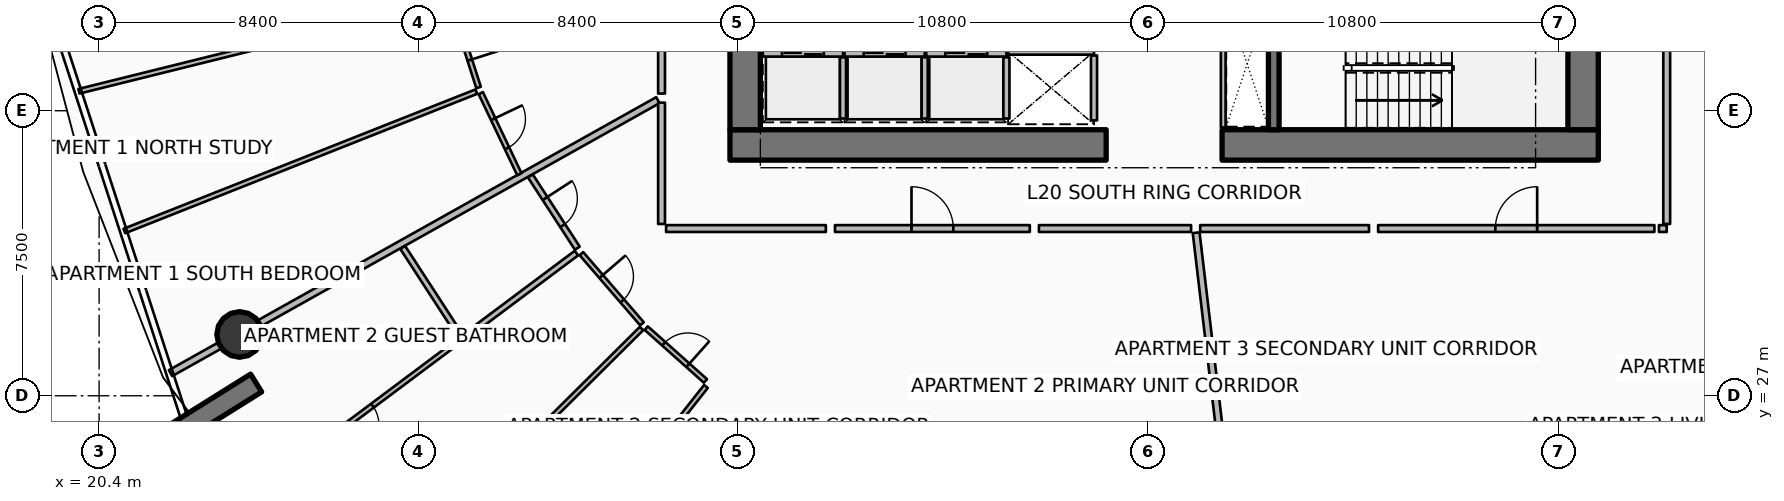
"""IFC4 building model, lengths in metres.
Left out: names, types, materials, properties, quantities, classifications, styles, units other than length and angle.
Written with IfcOpenShell. Run it as: python <this file> out.ifc"""

import sys

from ifc_helpers import new_model, si_unit, direction, frame, frame_2d, origin, origin_2d, place, context, subcontext, project, spatial, rectangle, circle, extrude, element, fill, save


model = new_model("IFC4")
c1 = context("Model", 3, precision=1e-05, world=origin(), true_north=direction((0.0, 1.0)))
c2 = subcontext(c1, "Body", "Model", "MODEL_VIEW")
j1 = project(units=[si_unit("LENGTHUNIT", "METRE"), si_unit("PLANEANGLEUNIT", "RADIAN")], contexts=[c1])
p1 = place(None, origin())
s1 = spatial("IfcSite", under=j1, at=p1, CompositionType="ELEMENT")
p2 = place(p1, origin())
s2 = spatial("IfcBuilding", under=s1, at=p2, CompositionType="ELEMENT")
p3 = place(p2, frame((0.0, 0.0, 82.65)))
s3 = spatial("IfcBuildingStorey", under=s2, at=p3, CompositionType="ELEMENT", Elevation=82.65)
p4 = place(p3, frame((37.0, 33.6, 0.0), z_axis=(0.0, 0.0, 1.0), x_axis=(1.0, 0.0, 0.0)))
e1 = element("IfcWall", 1, at=p4, inside=s3, PredefinedType="SHEAR", context=c2, shape_type="SweptSolid", body=[
    extrude(rectangle(XDim=9.9, YDim=0.8, at=frame_2d((4.95, 0.0))), origin(), (0.0, 0.0, 1.0), 3.75),
])
p5 = place(p3, frame((49.95, 33.6, 0.0), z_axis=(0.0, 0.0, 1.0), x_axis=(1.0, 0.0, 0.0)))
e2 = element("IfcWall", 2, at=p5, inside=s3, PredefinedType="SHEAR", context=c2, shape_type="SweptSolid", body=[
    extrude(rectangle(XDim=9.9, YDim=0.8, at=frame_2d((4.95, 0.0))), origin(), (0.0, 0.0, 1.0), 3.75),
])
for number, where, z_axis, x_axis in (
    (3, (37.4, 34.0, 0.0), (0.0, 0.0, 1.0), (0.0, 1.0, 0.0)),
    (4, (59.45, 34.0, 0.0), (0.0, 0.0, 1.0), (0.0, 1.0, 0.0)),
):
    element("IfcWall", number, at=place(p3, frame(where, z_axis=z_axis, x_axis=x_axis)), inside=s3, PredefinedType="SHEAR", context=c2, shape_type="SweptSolid", body=[
        extrude(rectangle(XDim=16.0, YDim=0.8, at=frame_2d((8.0, 0.0))), origin(), (0.0, 0.0, 1.0), 3.75),
    ])
p6 = place(p3, frame((51.31, 34.0, 0.0), z_axis=(0.0, 0.0, 1.0), x_axis=(0.0, 1.0, 0.0)))
e5 = element("IfcWall", 5, at=p6, inside=s3, PredefinedType="SHEAR", context=c2, shape_type="SweptSolid", body=[
    extrude(rectangle(XDim=3.5, YDim=0.28, at=frame_2d((1.75, 0.0))), origin(), (0.0, 0.0, 1.0), 3.75),
])
p7 = place(p3, frame((24.531, 27.335, 0.0), z_axis=(0.0, 0.0, 1.0), x_axis=(-0.848053161125, -0.529911158502, 0.0)))
e6 = element("IfcWall", 6, at=p7, inside=s3, PredefinedType="SOLIDWALL", context=c2, shape_type="SweptSolid", body=[
    extrude(rectangle(XDim=3.5, YDim=0.55, at=frame_2d((1.75, 0.0))), origin(), (0.0, 0.0, 1.0), 3.75),
])
p8 = place(p3, frame((24.097, 28.614, 0.0), z_axis=(0.0, 0.0, 1.0), x_axis=(1.0, 0.0, 0.0)))
e7 = element("IfcColumn", 7, at=p8, inside=s3, PredefinedType="COLUMN", context=c2, shape_type="SweptSolid", body=[
    extrude(circle(Radius=0.6, at=origin_2d()), origin(), (0.0, 0.0, 1.0), 3.5),
])
p9 = place(p3, frame((37.865, 36.005, 0.0), z_axis=(0.0, 0.0, 1.0), x_axis=(1.0, 0.0, 0.0)))
e8 = element("IfcWall", 8, at=p9, inside=s3, PredefinedType="PARTITIONING", context=c2, shape_type="SweptSolid", body=[
    extrude(rectangle(XDim=2.11, YDim=0.16, at=frame_2d((1.055, 0.0))), origin(), (0.0, 0.0, 1.0), 3.5),
])
p10 = place(p9, frame((0.505, 0.0, 0.0)))
e9 = element("IfcOpeningElement", 9, at=p10, cuts=e8, PredefinedType="OPENING", context=c2, shape_type="SweptSolid", body=[
    extrude(rectangle(XDim=1.1, YDim=2.1, at=frame_2d((0.55, 1.05))), frame((0.0, 0.09, 0.0), z_axis=(0.0, -1.0, 0.0), x_axis=(1.0, 0.0, 0.0)), (0.0, 0.0, 1.0), 0.18),
])
p11 = place(p3, frame((39.975, 34.295, 0.0), z_axis=(0.0, 0.0, 1.0), x_axis=(0.0, 1.0, 0.0)))
e10 = element("IfcWall", 10, at=p11, inside=s3, PredefinedType="PARTITIONING", context=c2, shape_type="SweptSolid", body=[
    extrude(rectangle(XDim=1.61, YDim=0.16, at=frame_2d((0.805, 0.0))), origin(), (0.0, 0.0, 1.0), 3.5),
])
p12 = place(p3, frame((40.015, 36.005, 0.0), z_axis=(0.0, 0.0, 1.0), x_axis=(1.0, 0.0, 0.0)))
e11 = element("IfcWall", 11, at=p12, inside=s3, PredefinedType="PARTITIONING", context=c2, shape_type="SweptSolid", body=[
    extrude(rectangle(XDim=2.11, YDim=0.16, at=frame_2d((1.055, 0.0))), origin(), (0.0, 0.0, 1.0), 3.5),
])
p13 = place(p12, frame((0.505, 0.0, 0.0)))
e12 = element("IfcOpeningElement", 12, at=p13, cuts=e11, PredefinedType="OPENING", context=c2, shape_type="SweptSolid", body=[
    extrude(rectangle(XDim=1.1, YDim=2.1, at=frame_2d((0.55, 1.05))), frame((0.0, 0.09, 0.0), z_axis=(0.0, -1.0, 0.0), x_axis=(1.0, 0.0, 0.0)), (0.0, 0.0, 1.0), 0.18),
])
p14 = place(p3, frame((42.125, 34.295, 0.0), z_axis=(0.0, 0.0, 1.0), x_axis=(0.0, 1.0, 0.0)))
e13 = element("IfcWall", 13, at=p14, inside=s3, PredefinedType="PARTITIONING", context=c2, shape_type="SweptSolid", body=[
    extrude(rectangle(XDim=1.61, YDim=0.16, at=frame_2d((0.805, 0.0))), origin(), (0.0, 0.0, 1.0), 3.5),
])
p15 = place(p3, frame((42.165, 36.005, 0.0), z_axis=(0.0, 0.0, 1.0), x_axis=(1.0, 0.0, 0.0)))
e14 = element("IfcWall", 14, at=p15, inside=s3, PredefinedType="PARTITIONING", context=c2, shape_type="SweptSolid", body=[
    extrude(rectangle(XDim=2.11, YDim=0.16, at=frame_2d((1.055, 0.0))), origin(), (0.0, 0.0, 1.0), 3.5),
])
p16 = place(p15, frame((0.505, 0.0, 0.0)))
e15 = element("IfcOpeningElement", 15, at=p16, cuts=e14, PredefinedType="OPENING", context=c2, shape_type="SweptSolid", body=[
    extrude(rectangle(XDim=1.1, YDim=2.1, at=frame_2d((0.55, 1.05))), frame((0.0, 0.09, 0.0), z_axis=(0.0, -1.0, 0.0), x_axis=(1.0, 0.0, 0.0)), (0.0, 0.0, 1.0), 0.18),
])
p17 = place(p3, frame((44.275, 34.295, 0.0), z_axis=(0.0, 0.0, 1.0), x_axis=(0.0, 1.0, 0.0)))
e16 = element("IfcWall", 16, at=p17, inside=s3, PredefinedType="PARTITIONING", context=c2, shape_type="SweptSolid", body=[
    extrude(rectangle(XDim=1.61, YDim=0.16, at=frame_2d((0.805, 0.0))), origin(), (0.0, 0.0, 1.0), 3.5),
])
p18 = place(p3, frame((44.32, 36.055, 0.0), z_axis=(0.0, 0.0, 1.0), x_axis=(1.0, 0.0, 0.0)))
e17 = element("IfcWall", 17, at=p18, inside=s3, PredefinedType="PARTITIONING", context=c2, shape_type="SweptSolid", body=[
    extrude(rectangle(XDim=2.26, YDim=0.16, at=frame_2d((1.13, 0.0))), origin(), (0.0, 0.0, 1.0), 3.5),
])
p19 = place(p3, frame((46.58, 34.245, 0.0), z_axis=(0.0, 0.0, 1.0), x_axis=(0.0, 1.0, 0.0)))
e18 = element("IfcWall", 18, at=p19, inside=s3, PredefinedType="PARTITIONING", context=c2, shape_type="SweptSolid", body=[
    extrude(rectangle(XDim=1.71, YDim=0.16, at=frame_2d((0.855, 0.0))), origin(), (0.0, 0.0, 1.0), 3.5),
])
p20 = place(p3, frame((49.98, 34.06, 0.0), z_axis=(0.0, 0.0, 1.0), x_axis=(0.0, 1.0, 0.0)))
e19 = element("IfcWall", 19, at=p20, inside=s3, PredefinedType="PARTITIONING", context=c2, shape_type="SweptSolid", body=[
    extrude(rectangle(XDim=3.4, YDim=0.125, at=frame_2d((1.7, 0.0))), origin(), (0.0, 0.0, 1.0), 2.94),
])
p21 = place(p3, frame((35.104, 34.778, 0.0), z_axis=(0.0, 0.0, 1.0), x_axis=(-0.872490437896, -0.488631185845, 0.0)))
e20 = element("IfcWall", 20, at=p21, inside=s3, PredefinedType="PARTITIONING", context=c2, shape_type="SweptSolid", body=[
    extrude(rectangle(XDim=14.699, YDim=0.18, at=frame_2d((7.35, 0.0))), origin(), (0.0, 0.0, 1.0), 2.94),
])
p22 = place(p3, frame((49.268, 31.291, 0.0), z_axis=(0.0, 0.0, 1.0), x_axis=(0.117532311618, -0.993069058891, 0.0)))
e21 = element("IfcWall", 21, at=p22, inside=s3, PredefinedType="PARTITIONING", context=c2, shape_type="SweptSolid", body=[
    extrude(rectangle(XDim=13.138, YDim=0.18, at=frame_2d((6.569, 0.0))), origin(), (0.0, 0.0, 1.0), 2.94),
])
p23 = place(p3, frame((61.756, 38.12, 0.0), z_axis=(0.0, 0.0, 1.0), x_axis=(0.962455861176, -0.271438234756, 0.0)))
e22 = element("IfcWall", 22, at=p23, inside=s3, PredefinedType="PARTITIONING", context=c2, shape_type="SweptSolid", body=[
    extrude(rectangle(XDim=14.279, YDim=0.18, at=frame_2d((7.139, 0.0))), origin(), (0.0, 0.0, 1.0), 2.94),
])
p24 = place(p3, frame((35.2, 40.365, 0.0), z_axis=(0.0, 0.0, 1.0), x_axis=(0.0, -1.0, 0.0)))
e23 = element("IfcWall", 23, at=p24, inside=s3, PredefinedType="PARTITIONING", context=c2, shape_type="SweptSolid", body=[
    extrude(rectangle(XDim=5.413, YDim=0.18, at=frame_2d((2.707, 0.0))), origin(), (0.0, 0.0, 1.0), 2.94),
])
p25 = place(p3, frame((29.552, 37.417, 0.0), z_axis=(0.0, 0.0, 1.0), x_axis=(-0.970504192203, -0.241084244437, 0.0)))
e24 = element("IfcWall", 24, at=p25, inside=s3, PredefinedType="PARTITIONING", context=c2, shape_type="SweptSolid", body=[
    extrude(rectangle(XDim=9.976, YDim=0.125, at=frame_2d((4.988, 0.0))), origin(), (0.0, 0.0, 1.0), 2.94),
])
p26 = place(p3, frame((30.326, 35.002, 0.0), z_axis=(0.0, 0.0, 1.0), x_axis=(-0.929777602375, -0.368121732748, 0.0)))
e25 = element("IfcWall", 25, at=p26, inside=s3, PredefinedType="PARTITIONING", context=c2, shape_type="SweptSolid", body=[
    extrude(rectangle(XDim=9.961, YDim=0.125, at=frame_2d((4.98, 0.0))), origin(), (0.0, 0.0, 1.0), 2.94),
])
p27 = place(p3, frame((29.663, 37.363, 0.0), z_axis=(0.0, 0.0, 1.0), x_axis=(0.305393983716, -0.952226083822, 0.0)))
e26 = element("IfcWall", 26, at=p27, inside=s3, PredefinedType="PARTITIONING", context=c2, shape_type="SweptSolid", body=[
    extrude(rectangle(XDim=2.364, YDim=0.125, at=frame_2d((1.182, 0.0))), origin(), (0.0, 0.0, 1.0), 2.94),
])
p28 = place(p27, frame((0.757, 0.0, 0.0)))
e27 = element("IfcOpeningElement", 27, at=p28, cuts=e26, PredefinedType="OPENING", context=c2, shape_type="SweptSolid", body=[
    extrude(rectangle(XDim=0.85, YDim=2.06, at=frame_2d((0.425, 1.03))), frame((0.0, 0.073, 0.0), z_axis=(0.0, -1.0, 0.0), x_axis=(1.0, 0.0, 0.0)), (0.0, 0.0, 1.0), 0.145),
])
p29 = place(p3, frame((30.444, 34.963, 0.0), z_axis=(0.0, 0.0, 1.0), x_axis=(0.429404357622, -0.903112339443, 0.0)))
e28 = element("IfcWall", 28, at=p29, inside=s3, PredefinedType="PARTITIONING", context=c2, shape_type="SweptSolid", body=[
    extrude(rectangle(XDim=2.364, YDim=0.125, at=frame_2d((1.182, 0.0))), origin(), (0.0, 0.0, 1.0), 2.94),
])
p30 = place(p29, frame((0.757, 0.0, 0.0)))
e29 = element("IfcOpeningElement", 29, at=p30, cuts=e28, PredefinedType="OPENING", context=c2, shape_type="SweptSolid", body=[
    extrude(rectangle(XDim=0.85, YDim=2.06, at=frame_2d((0.425, 1.03))), frame((0.0, 0.073, 0.0), z_axis=(0.0, -1.0, 0.0), x_axis=(1.0, 0.0, 0.0)), (0.0, 0.0, 1.0), 0.145),
])
p31 = place(p3, frame((39.764, 31.4, 0.0), z_axis=(0.0, 0.0, 1.0), x_axis=(1.0, 0.0, 0.0)))
e30 = element("IfcWall", 30, at=p31, inside=s3, PredefinedType="PARTITIONING", context=c2, shape_type="SweptSolid", body=[
    extrude(rectangle(XDim=5.127, YDim=0.18, at=frame_2d((2.563, 0.0))), origin(), (0.0, 0.0, 1.0), 2.94),
])
p32 = place(p31, frame((2.013, 0.0, 0.0)))
e31 = element("IfcOpeningElement", 31, at=p32, cuts=e30, PredefinedType="OPENING", context=c2, shape_type="SweptSolid", body=[
    extrude(rectangle(XDim=1.1, YDim=2.1, at=frame_2d((0.55, 1.05))), frame((0.0, 0.1, 0.0), z_axis=(0.0, -1.0, 0.0), x_axis=(1.0, 0.0, 0.0)), (0.0, 0.0, 1.0), 0.2),
])
p33 = place(p3, frame((35.2, 34.712, 0.0), z_axis=(0.0, 0.0, 1.0), x_axis=(0.0, -1.0, 0.0)))
e32 = element("IfcWall", 32, at=p33, inside=s3, PredefinedType="PARTITIONING", context=c2, shape_type="SweptSolid", body=[
    extrude(rectangle(XDim=3.192, YDim=0.18, at=frame_2d((1.596, 0.0))), origin(), (0.0, 0.0, 1.0), 2.94),
])
p34 = place(p3, frame((35.32, 31.4, 0.0), z_axis=(0.0, 0.0, 1.0), x_axis=(1.0, 0.0, 0.0)))
e33 = element("IfcWall", 33, at=p34, inside=s3, PredefinedType="PARTITIONING", context=c2, shape_type="SweptSolid", body=[
    extrude(rectangle(XDim=4.204, YDim=0.18, at=frame_2d((2.102, 0.0))), origin(), (0.0, 0.0, 1.0), 2.94),
])
p35 = place(p3, frame((36.368, 27.245, 0.0), z_axis=(0.0, 0.0, 1.0), x_axis=(-0.619096231027, -0.785315132115, 0.0)))
e34 = element("IfcWall", 34, at=p35, inside=s3, PredefinedType="PARTITIONING", context=c2, shape_type="SweptSolid", body=[
    extrude(rectangle(XDim=9.882, YDim=0.125, at=frame_2d((4.941, 0.0))), origin(), (0.0, 0.0, 1.0), 2.94),
])
p36 = place(p3, frame((31.748, 32.784, 0.0), z_axis=(0.0, 0.0, 1.0), x_axis=(0.544920213423, -0.838487901524, 0.0)))
e35 = element("IfcWall", 35, at=p36, inside=s3, PredefinedType="PARTITIONING", context=c2, shape_type="SweptSolid", body=[
    extrude(rectangle(XDim=2.267, YDim=0.15, at=frame_2d((1.134, 0.0))), origin(), (0.0, 0.0, 1.0), 2.94),
])
p37 = place(p36, frame((0.708, 0.0, 0.0)))
e36 = element("IfcOpeningElement", 36, at=p37, cuts=e35, PredefinedType="OPENING", context=c2, shape_type="SweptSolid", body=[
    extrude(rectangle(XDim=0.85, YDim=2.06, at=frame_2d((0.425, 1.03))), frame((0.0, 0.085, 0.0), z_axis=(0.0, -1.0, 0.0), x_axis=(1.0, 0.0, 0.0)), (0.0, 0.0, 1.0), 0.17),
])
p38 = place(p3, frame((28.389, 30.903, 0.0), z_axis=(0.0, 0.0, 1.0), x_axis=(0.544849096032, -0.838534115318, 0.0)))
e37 = element("IfcWall", 37, at=p38, inside=s3, PredefinedType="PARTITIONING", context=c2, shape_type="SweptSolid", body=[
    extrude(rectangle(XDim=2.773, YDim=0.15, at=frame_2d((1.387, 0.0))), origin(), (0.0, 0.0, 1.0), 2.94),
])
p39 = place(p3, frame((32.961, 30.754, 0.0), z_axis=(0.0, 0.0, 1.0), x_axis=(-0.800889069655, -0.598812740435, 0.0)))
e38 = element("IfcWall", 38, at=p39, inside=s3, PredefinedType="PARTITIONING", context=c2, shape_type="SweptSolid", body=[
    extrude(rectangle(XDim=3.72, YDim=0.15, at=frame_2d((1.86, 0.0))), origin(), (0.0, 0.0, 1.0), 2.94),
])
p40 = place(p3, frame((29.877, 28.448, 0.0), z_axis=(0.0, 0.0, 1.0), x_axis=(-0.800862229892, -0.598848635911, 0.0)))
e39 = element("IfcWall", 39, at=p40, inside=s3, PredefinedType="PARTITIONING", context=c2, shape_type="SweptSolid", body=[
    extrude(rectangle(XDim=6.552, YDim=0.125, at=frame_2d((3.276, 0.0))), origin(), (0.0, 0.0, 1.0), 2.94),
])
p41 = place(p40, frame((2.851, 0.0, 0.0)))
e40 = element("IfcOpeningElement", 40, at=p41, cuts=e39, PredefinedType="OPENING", context=c2, shape_type="SweptSolid", body=[
    extrude(rectangle(XDim=0.85, YDim=2.06, at=frame_2d((0.425, 1.03))), frame((0.0, 0.073, 0.0), z_axis=(0.0, -1.0, 0.0), x_axis=(1.0, 0.0, 0.0)), (0.0, 0.0, 1.0), 0.145),
])
p42 = place(p3, frame((34.673, 28.769, 0.0), z_axis=(0.0, 0.0, 1.0), x_axis=(-0.709671596246, -0.70453262911, 0.0)))
e41 = element("IfcWall", 41, at=p42, inside=s3, PredefinedType="PARTITIONING", context=c2, shape_type="SweptSolid", body=[
    extrude(rectangle(XDim=9.882, YDim=0.125, at=frame_2d((4.941, 0.0))), origin(), (0.0, 0.0, 1.0), 2.94),
])
p43 = place(p3, frame((33.092, 30.74, 0.0), z_axis=(0.0, 0.0, 1.0), x_axis=(0.653244508484, -0.757147021479, 0.0)))
e42 = element("IfcWall", 42, at=p43, inside=s3, PredefinedType="PARTITIONING", context=c2, shape_type="SweptSolid", body=[
    extrude(rectangle(XDim=2.439, YDim=0.125, at=frame_2d((1.219, 0.0))), origin(), (0.0, 0.0, 1.0), 2.94),
])
p44 = place(p43, frame((0.794, 0.0, 0.0)))
e43 = element("IfcOpeningElement", 43, at=p44, cuts=e42, PredefinedType="OPENING", context=c2, shape_type="SweptSolid", body=[
    extrude(rectangle(XDim=0.85, YDim=2.06, at=frame_2d((0.425, 1.03))), frame((0.0, 0.073, 0.0), z_axis=(0.0, -1.0, 0.0), x_axis=(1.0, 0.0, 0.0)), (0.0, 0.0, 1.0), 0.145),
])
p45 = place(p3, frame((34.797, 28.78, 0.0), z_axis=(0.0, 0.0, 1.0), x_axis=(0.74635037564, -0.665553241132, 0.0)))
e44 = element("IfcWall", 44, at=p45, inside=s3, PredefinedType="PARTITIONING", context=c2, shape_type="SweptSolid", body=[
    extrude(rectangle(XDim=2.088, YDim=0.125, at=frame_2d((1.044, 0.0))), origin(), (0.0, 0.0, 1.0), 2.94),
])
p46 = place(p45, frame((0.619, 0.0, 0.0)))
e45 = element("IfcOpeningElement", 45, at=p46, cuts=e44, PredefinedType="OPENING", context=c2, shape_type="SweptSolid", body=[
    extrude(rectangle(XDim=0.85, YDim=2.06, at=frame_2d((0.425, 1.03))), frame((0.0, 0.073, 0.0), z_axis=(0.0, -1.0, 0.0), x_axis=(1.0, 0.0, 0.0)), (0.0, 0.0, 1.0), 0.145),
])
p47 = place(p3, frame((45.131, 31.4, 0.0), z_axis=(0.0, 0.0, 1.0), x_axis=(1.0, 0.0, 0.0)))
e46 = element("IfcWall", 46, at=p47, inside=s3, PredefinedType="PARTITIONING", context=c2, shape_type="SweptSolid", body=[
    extrude(rectangle(XDim=4.004, YDim=0.18, at=frame_2d((2.002, 0.0))), origin(), (0.0, 0.0, 1.0), 2.94),
])
p48 = place(p3, frame((54.056, 31.4, 0.0), z_axis=(0.0, 0.0, 1.0), x_axis=(1.0, 0.0, 0.0)))
e47 = element("IfcWall", 47, at=p48, inside=s3, PredefinedType="PARTITIONING", context=c2, shape_type="SweptSolid", body=[
    extrude(rectangle(XDim=7.27, YDim=0.18, at=frame_2d((3.635, 0.0))), origin(), (0.0, 0.0, 1.0), 2.94),
])
p49 = place(p48, frame((3.085, 0.0, 0.0)))
e48 = element("IfcOpeningElement", 48, at=p49, cuts=e47, PredefinedType="OPENING", context=c2, shape_type="SweptSolid", body=[
    extrude(rectangle(XDim=1.1, YDim=2.1, at=frame_2d((0.55, 1.05))), frame((0.0, 0.1, 0.0), z_axis=(0.0, -1.0, 0.0), x_axis=(1.0, 0.0, 0.0)), (0.0, 0.0, 1.0), 0.2),
])
p50 = place(p3, frame((49.375, 31.4, 0.0), z_axis=(0.0, 0.0, 1.0), x_axis=(1.0, 0.0, 0.0)))
e49 = element("IfcWall", 49, at=p50, inside=s3, PredefinedType="PARTITIONING", context=c2, shape_type="SweptSolid", body=[
    extrude(rectangle(XDim=4.442, YDim=0.18, at=frame_2d((2.221, 0.0))), origin(), (0.0, 0.0, 1.0), 2.94),
])
p51 = place(p3, frame((61.446, 31.4, 0.0), z_axis=(0.0, 0.0, 1.0), x_axis=(1.0, 0.0, 0.0)))
e50 = element("IfcWall", 50, at=p51, inside=s3, PredefinedType="PARTITIONING", context=c2, shape_type="SweptSolid", body=[
    extrude(rectangle(XDim=0.204, YDim=0.18, at=frame_2d((0.102, 0.0))), origin(), (0.0, 0.0, 1.0), 2.94),
])
p52 = place(p3, frame((61.65, 31.52, 0.0), z_axis=(0.0, 0.0, 1.0), x_axis=(0.0, 1.0, 0.0)))
e51 = element("IfcWall", 51, at=p52, inside=s3, PredefinedType="PARTITIONING", context=c2, shape_type="SweptSolid", body=[
    extrude(rectangle(XDim=6.51, YDim=0.18, at=frame_2d((3.255, 0.0))), origin(), (0.0, 0.0, 1.0), 2.94),
])
p53 = place(p10, origin())
e52 = element("IfcDoor", 52, at=p53, inside=s3, OperationType="DOUBLE_DOOR_SLIDING", PredefinedType="DOOR", context=c2, shape_type="SweptSolid", body=[
    extrude(rectangle(XDim=1.1, YDim=2.1, at=frame_2d((0.55, 1.05))), frame((0.0, 0.025, 0.0), z_axis=(0.0, -1.0, 0.0), x_axis=(1.0, 0.0, 0.0)), (0.0, 0.0, 1.0), 0.05),
])
fill(e9, e52)
p54 = place(p13, origin())
e53 = element("IfcDoor", 53, at=p54, inside=s3, OperationType="DOUBLE_DOOR_SLIDING", PredefinedType="DOOR", context=c2, shape_type="SweptSolid", body=[
    extrude(rectangle(XDim=1.1, YDim=2.1, at=frame_2d((0.55, 1.05))), frame((0.0, 0.025, 0.0), z_axis=(0.0, -1.0, 0.0), x_axis=(1.0, 0.0, 0.0)), (0.0, 0.0, 1.0), 0.05),
])
fill(e12, e53)
p55 = place(p16, origin())
e54 = element("IfcDoor", 54, at=p55, inside=s3, OperationType="DOUBLE_DOOR_SLIDING", PredefinedType="DOOR", context=c2, shape_type="SweptSolid", body=[
    extrude(rectangle(XDim=1.1, YDim=2.1, at=frame_2d((0.55, 1.05))), frame((0.0, 0.025, 0.0), z_axis=(0.0, -1.0, 0.0), x_axis=(1.0, 0.0, 0.0)), (0.0, 0.0, 1.0), 0.05),
])
fill(e15, e54)
p56 = place(p28, origin())
e55 = element("IfcDoor", 55, at=p56, inside=s3, OperationType="SINGLE_SWING_RIGHT", PredefinedType="DOOR", context=c2, shape_type="SweptSolid", body=[
    extrude(rectangle(XDim=0.85, YDim=2.06, at=frame_2d((0.425, 1.03))), frame((0.0, 0.025, 0.0), z_axis=(0.0, -1.0, 0.0), x_axis=(1.0, 0.0, 0.0)), (0.0, 0.0, 1.0), 0.05),
])
fill(e27, e55)
p57 = place(p30, origin())
e56 = element("IfcDoor", 56, at=p57, inside=s3, OperationType="SINGLE_SWING_LEFT", PredefinedType="DOOR", context=c2, shape_type="SweptSolid", body=[
    extrude(rectangle(XDim=0.85, YDim=2.06, at=frame_2d((0.425, 1.03))), frame((0.0, 0.025, 0.0), z_axis=(0.0, -1.0, 0.0), x_axis=(1.0, 0.0, 0.0)), (0.0, 0.0, 1.0), 0.05),
])
fill(e29, e56)
p58 = place(p32, origin())
e57 = element("IfcDoor", 57, at=p58, inside=s3, OperationType="SINGLE_SWING_LEFT", PredefinedType="DOOR", context=c2, shape_type="SweptSolid", body=[
    extrude(rectangle(XDim=1.1, YDim=2.1, at=frame_2d((0.55, 1.05))), frame((0.0, 0.025, 0.0), z_axis=(0.0, -1.0, 0.0), x_axis=(1.0, 0.0, 0.0)), (0.0, 0.0, 1.0), 0.05),
])
fill(e31, e57)
p59 = place(p37, origin())
e58 = element("IfcDoor", 58, at=p59, inside=s3, OperationType="SINGLE_SWING_LEFT", PredefinedType="DOOR", context=c2, shape_type="SweptSolid", body=[
    extrude(rectangle(XDim=0.85, YDim=2.06, at=frame_2d((0.425, 1.03))), frame((0.0, 0.025, 0.0), z_axis=(0.0, -1.0, 0.0), x_axis=(1.0, 0.0, 0.0)), (0.0, 0.0, 1.0), 0.05),
])
fill(e36, e58)
p60 = place(p41, origin())
e59 = element("IfcDoor", 59, at=p60, inside=s3, OperationType="SINGLE_SWING_RIGHT", PredefinedType="DOOR", context=c2, shape_type="SweptSolid", body=[
    extrude(rectangle(XDim=0.85, YDim=2.06, at=frame_2d((0.425, 1.03))), frame((0.0, 0.025, 0.0), z_axis=(0.0, -1.0, 0.0), x_axis=(1.0, 0.0, 0.0)), (0.0, 0.0, 1.0), 0.05),
])
fill(e40, e59)
p61 = place(p44, origin())
e60 = element("IfcDoor", 60, at=p61, inside=s3, OperationType="SINGLE_SWING_LEFT", PredefinedType="DOOR", context=c2, shape_type="SweptSolid", body=[
    extrude(rectangle(XDim=0.85, YDim=2.06, at=frame_2d((0.425, 1.03))), frame((0.0, 0.025, 0.0), z_axis=(0.0, -1.0, 0.0), x_axis=(1.0, 0.0, 0.0)), (0.0, 0.0, 1.0), 0.05),
])
fill(e43, e60)
p62 = place(p46, origin())
e61 = element("IfcDoor", 61, at=p62, inside=s3, OperationType="SINGLE_SWING_RIGHT", PredefinedType="DOOR", context=c2, shape_type="SweptSolid", body=[
    extrude(rectangle(XDim=0.85, YDim=2.06, at=frame_2d((0.425, 1.03))), frame((0.0, 0.025, 0.0), z_axis=(0.0, -1.0, 0.0), x_axis=(1.0, 0.0, 0.0)), (0.0, 0.0, 1.0), 0.05),
])
fill(e45, e61)
p63 = place(p49, origin())
e62 = element("IfcDoor", 62, at=p63, inside=s3, OperationType="SINGLE_SWING_RIGHT", PredefinedType="DOOR", context=c2, shape_type="SweptSolid", body=[
    extrude(rectangle(XDim=1.1, YDim=2.1, at=frame_2d((0.55, 1.05))), frame((0.0, 0.025, 0.0), z_axis=(0.0, -1.0, 0.0), x_axis=(1.0, 0.0, 0.0)), (0.0, 0.0, 1.0), 0.05),
])
fill(e48, e62)
save(model, sys.argv[1])
